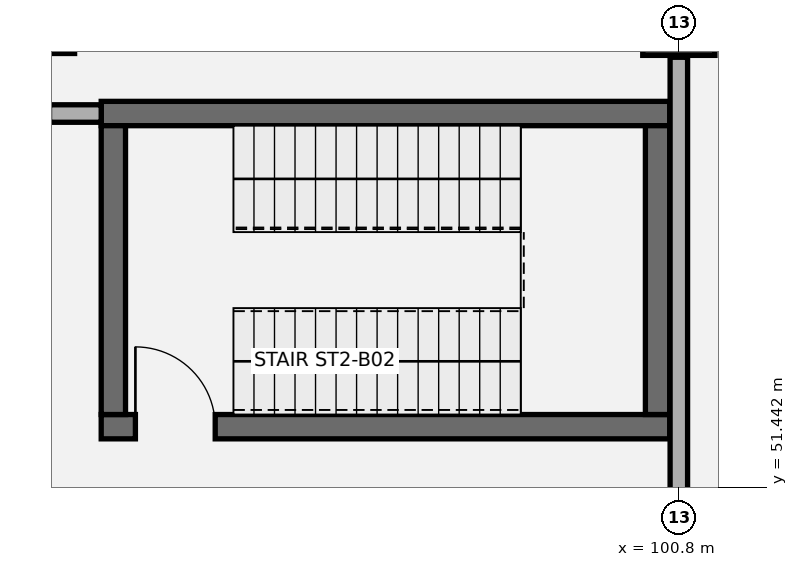
"""IFC4 building model, lengths in metres.
Left out: names, types, materials, properties, quantities, classifications, styles, units other than length and angle.
Written with IfcOpenShell. Run it as: python <this file> out.ifc"""

import sys

from ifc_helpers import new_model, si_unit, direction, frame, frame_2d, origin, origin_2d, place, context, subcontext, project, spatial, rectangle, extrude, element, fill, save


model = new_model("IFC4")
c1 = context("Model", 3, precision=1e-05, world=origin(), true_north=direction((0.0, 1.0)))
c2 = subcontext(c1, "Body", "Model", "MODEL_VIEW")
j1 = project(units=[si_unit("LENGTHUNIT", "METRE"), si_unit("PLANEANGLEUNIT", "RADIAN")], contexts=[c1])
p1 = place(None, origin())
s1 = spatial("IfcSite", under=j1, at=p1, CompositionType="ELEMENT")
p2 = place(p1, origin())
s2 = spatial("IfcBuilding", under=s1, at=p2, CompositionType="ELEMENT")
p3 = place(p2, frame((0.0, 0.0, -9.6)))
s3 = spatial("IfcBuildingStorey", under=s2, at=p3, CompositionType="ELEMENT", Elevation=-9.6)
p4 = place(p3, frame((92.4, 57.6, 0.0), z_axis=(0.0, 0.0, 1.0), x_axis=(1.0, 0.0, 0.0)))
e1 = element("IfcColumn", 1, at=p4, inside=s3, PredefinedType="COLUMN", context=c2, shape_type="SweptSolid", body=[
    extrude(rectangle(XDim=0.9, YDim=0.9, at=origin_2d()), origin(), (0.0, 0.0, 1.0), 4.8),
])
p5 = place(p3, frame((100.8, 57.6, 0.0), z_axis=(0.0, 0.0, 1.0), x_axis=(1.0, 0.0, 0.0)))
e2 = element("IfcColumn", 2, at=p5, inside=s3, PredefinedType="COLUMN", context=c2, shape_type="SweptSolid", body=[
    extrude(rectangle(XDim=0.95, YDim=0.95, at=origin_2d()), origin(), (0.0, 0.0, 1.0), 4.8),
])
p6 = place(p3, frame((93.2, 52.24, 0.0), z_axis=(0.0, 0.0, 1.0), x_axis=(1.0, 0.0, 0.0)))
e3 = element("IfcWall", 3, at=p6, inside=s3, PredefinedType="SHEAR", context=c2, shape_type="SweptSolid", body=[
    extrude(rectangle(XDim=7.48, YDim=0.32, at=frame_2d((3.74, 0.0))), origin(), (0.0, 0.0, 1.0), 4.4),
])
p7 = place(p6, frame((0.45, 0.0, 0.0)))
e4 = element("IfcOpeningElement", 4, at=p7, cuts=e3, PredefinedType="OPENING", context=c2, shape_type="SweptSolid", body=[
    extrude(rectangle(XDim=1.05, YDim=2.15, at=frame_2d((0.525, 1.075))), frame((0.0, 0.17, 0.0), z_axis=(0.0, -1.0, 0.0), x_axis=(1.0, 0.0, 0.0)), (0.0, 0.0, 1.0), 0.34),
])
p8 = place(p3, frame((93.2, 56.36, 0.0), z_axis=(0.0, 0.0, 1.0), x_axis=(1.0, 0.0, 0.0)))
e5 = element("IfcWall", 5, at=p8, inside=s3, PredefinedType="SHEAR", context=c2, shape_type="SweptSolid", body=[
    extrude(rectangle(XDim=7.48, YDim=0.32, at=frame_2d((3.74, 0.0))), origin(), (0.0, 0.0, 1.0), 4.4),
])
for number, where, z_axis, x_axis in (
    (6, (93.36, 52.4, 0.0), (0.0, 0.0, 1.0), (0.0, 1.0, 0.0)),
    (7, (100.52, 52.4, 0.0), (0.0, 0.0, 1.0), (0.0, 1.0, 0.0)),
):
    element("IfcWall", number, at=place(p3, frame(where, z_axis=z_axis, x_axis=x_axis)), inside=s3, PredefinedType="SHEAR", context=c2, shape_type="SweptSolid", body=[
        extrude(rectangle(XDim=3.8, YDim=0.32, at=frame_2d((1.9, 0.0))), origin(), (0.0, 0.0, 1.0), 4.4),
    ])
p9 = place(p3, frame((100.8, 50.9, 0.0), z_axis=(0.0, 0.0, 1.0), x_axis=(0.0, 1.0, 0.0)))
e8 = element("IfcWall", 8, at=p9, inside=s3, PredefinedType="PARTITIONING", context=c2, shape_type="SweptSolid", body=[
    extrude(rectangle(XDim=6.2, YDim=0.23, at=frame_2d((3.1, 0.0))), origin(), (0.0, 0.0, 1.0), 3.595),
])
p10 = place(p3, frame((92.52, 56.36, 0.0), z_axis=(0.0, 0.0, 1.0), x_axis=(1.0, 0.0, 0.0)))
e9 = element("IfcWall", 9, at=p10, inside=s3, PredefinedType="PARTITIONING", context=c2, shape_type="SweptSolid", body=[
    extrude(rectangle(XDim=0.68, YDim=0.23, at=frame_2d((0.34, 0.0))), origin(), (0.0, 0.0, 1.0), 4.4),
])
p11 = place(p7, origin())
e10 = element("IfcDoor", 10, at=p11, inside=s3, OperationType="SINGLE_SWING_LEFT", PredefinedType="DOOR", context=c2, shape_type="SweptSolid", body=[
    extrude(rectangle(XDim=1.05, YDim=2.15, at=frame_2d((0.525, 1.075))), frame((0.0, 0.025, 0.0), z_axis=(0.0, -1.0, 0.0), x_axis=(1.0, 0.0, 0.0)), (0.0, 0.0, 1.0), 0.05),
])
fill(e4, e10)
save(model, sys.argv[1])
